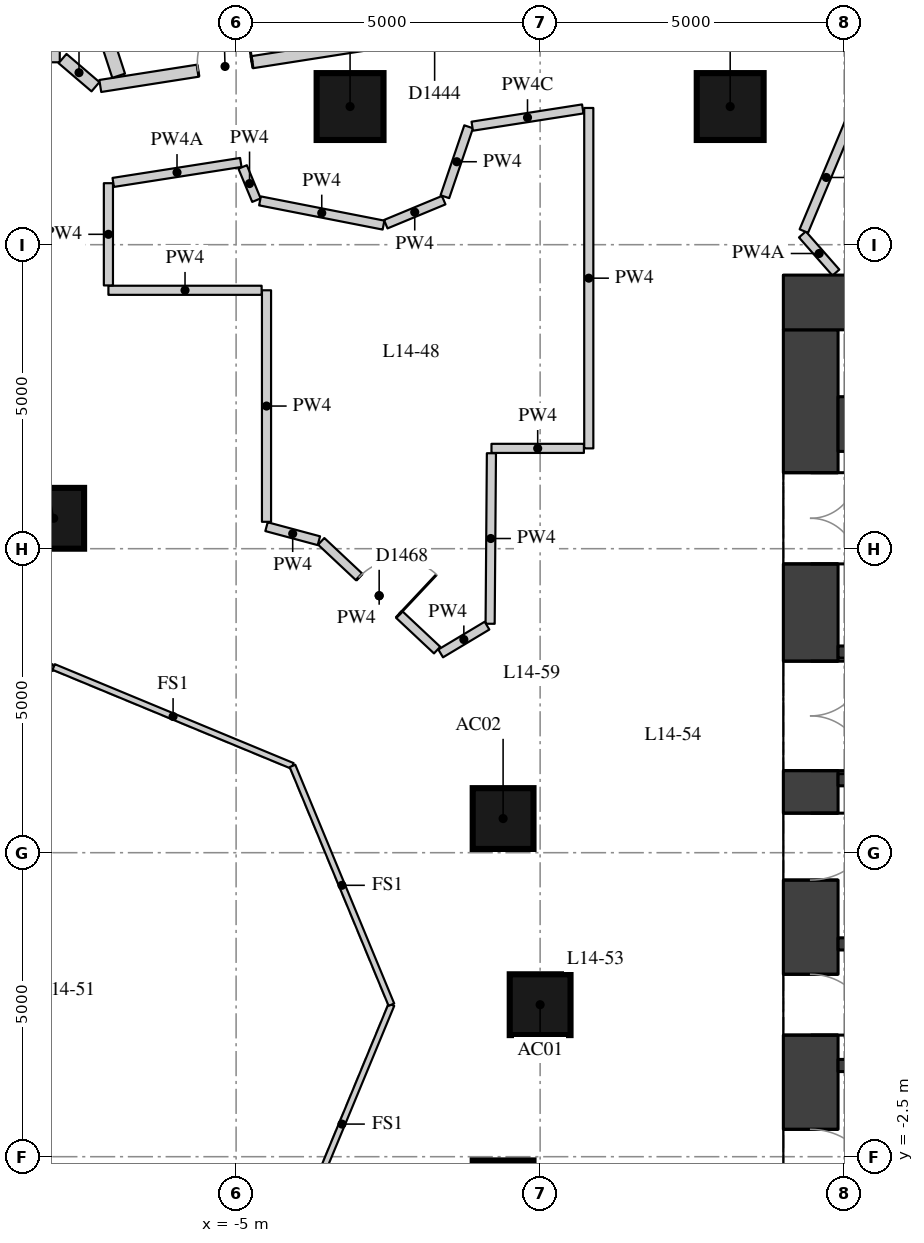
"""IFC4 building model, lengths in metres.
Left out: names, types, materials, properties, quantities, classifications, styles, units other than length and angle.
Written with IfcOpenShell. Run it as: python <this file> out.ifc"""

import sys

from ifc_helpers import new_model, si_unit, direction, frame, frame_2d, origin, origin_2d, place, context, subcontext, project, spatial, rectangle, extrude, element, fill, save


model = new_model("IFC4")
c1 = context("Model", 3, precision=1e-05, world=origin(), true_north=direction((0.0, 1.0)))
c2 = subcontext(c1, "Body", "Model", "MODEL_VIEW")
j1 = project(units=[si_unit("LENGTHUNIT", "METRE"), si_unit("PLANEANGLEUNIT", "RADIAN")], contexts=[c1])
p1 = place(None, origin())
s1 = spatial("IfcSite", under=j1, at=p1, CompositionType="ELEMENT")
p2 = place(p1, origin())
s2 = spatial("IfcBuilding", under=s1, at=p2, CompositionType="ELEMENT")
p3 = place(p2, frame((0.0, 0.0, 54.7)))
s3 = spatial("IfcBuildingStorey", under=s2, at=p3, CompositionType="ELEMENT", Elevation=54.7)
for number, where, z_axis, x_axis in (
    (1, (0.0, 0.0, 0.0), (0.0, 0.0, 1.0), (1.0, 0.0, 0.0)),
    (2, (-0.609, 3.062, 0.0), (0.0, 0.0, 1.0), (1.0, 0.0, 0.0)),
    (3, (-8.0, 8.0, 0.0), (0.0, 0.0, 1.0), (1.0, 0.0, 0.0)),
    (4, (-0.609, -3.062, 0.0), (0.0, 0.0, 1.0), (1.0, 0.0, 0.0)),
):
    element("IfcColumn", number, at=place(p3, frame(where, z_axis=z_axis, x_axis=x_axis)), inside=s3, PredefinedType="COLUMN", context=c2, shape_type="SweptSolid", body=[
        extrude(rectangle(XDim=1.0, YDim=1.0, at=origin_2d()), origin(), (0.0, 0.0, 1.0), 3.3),
    ])
for number, where, z_axis, x_axis in (
    (5, (3.126, 14.772, 0.0), (0.0, 0.0, 1.0), (1.0, 0.0, 0.0)),
    (6, (-3.126, 14.772, 0.0), (0.0, 0.0, 1.0), (1.0, 0.0, 0.0)),
):
    element("IfcColumn", number, at=place(p3, frame(where, z_axis=z_axis, x_axis=x_axis)), inside=s3, PredefinedType="COLUMN", context=c2, shape_type="SweptSolid", body=[
        extrude(rectangle(XDim=1.1, YDim=1.1, at=origin_2d()), origin(), (0.0, 0.0, 1.0), 3.3),
    ])
p4 = place(p3, frame((4.45, -11.1, 0.0), z_axis=(0.0, 0.0, 1.0), x_axis=(0.0, 1.0, 0.0)))
e7 = element("IfcWall", 7, at=p4, inside=s3, PredefinedType="SHEAR", context=c2, shape_type="SweptSolid", body=[
    extrude(rectangle(XDim=22.2, YDim=0.9, at=frame_2d((11.1, 0.0))), origin(), (0.0, 0.0, 1.0), 3.02),
])
p5 = place(p4, frame((2.35, 0.0, 0.0)))
e8 = element("IfcOpeningElement", 8, at=p5, cuts=e7, PredefinedType="OPENING", context=c2, shape_type="SweptSolid", body=[
    extrude(rectangle(XDim=1.5, YDim=2.1, at=frame_2d((0.75, 1.05))), frame((0.0, 0.46, 0.0), z_axis=(0.0, -1.0, 0.0), x_axis=(1.0, 0.0, 0.0)), (0.0, 0.0, 1.0), 0.92),
])
p6 = place(p4, frame((5.45, 0.0, 0.0)))
e9 = element("IfcOpeningElement", 9, at=p6, cuts=e7, PredefinedType="OPENING", context=c2, shape_type="SweptSolid", body=[
    extrude(rectangle(XDim=1.8, YDim=2.1, at=frame_2d((0.9, 1.05))), frame((0.0, 0.46, 0.0), z_axis=(0.0, -1.0, 0.0), x_axis=(1.0, 0.0, 0.0)), (0.0, 0.0, 1.0), 0.92),
])
p7 = place(p4, frame((7.95, 0.0, 0.0)))
e10 = element("IfcOpeningElement", 10, at=p7, cuts=e7, PredefinedType="OPENING", context=c2, shape_type="SweptSolid", body=[
    extrude(rectangle(XDim=1.1, YDim=2.1, at=frame_2d((0.55, 1.05))), frame((0.0, 0.46, 0.0), z_axis=(0.0, -1.0, 0.0), x_axis=(1.0, 0.0, 0.0)), (0.0, 0.0, 1.0), 0.92),
])
p8 = place(p4, frame((10.6, 0.0, 0.0)))
e11 = element("IfcOpeningElement", 11, at=p8, cuts=e7, PredefinedType="OPENING", context=c2, shape_type="SweptSolid", body=[
    extrude(rectangle(XDim=1.0, YDim=2.1, at=frame_2d((0.5, 1.05))), frame((0.0, 0.46, 0.0), z_axis=(0.0, -1.0, 0.0), x_axis=(1.0, 0.0, 0.0)), (0.0, 0.0, 1.0), 0.92),
])
p9 = place(p4, frame((13.15, 0.0, 0.0)))
e12 = element("IfcOpeningElement", 12, at=p9, cuts=e7, PredefinedType="OPENING", context=c2, shape_type="SweptSolid", body=[
    extrude(rectangle(XDim=1.1, YDim=2.1, at=frame_2d((0.55, 1.05))), frame((0.0, 0.46, 0.0), z_axis=(0.0, -1.0, 0.0), x_axis=(1.0, 0.0, 0.0)), (0.0, 0.0, 1.0), 0.92),
])
p10 = place(p4, frame((14.95, 0.0, 0.0)))
e13 = element("IfcOpeningElement", 13, at=p10, cuts=e7, PredefinedType="OPENING", context=c2, shape_type="SweptSolid", body=[
    extrude(rectangle(XDim=1.8, YDim=2.1, at=frame_2d((0.9, 1.05))), frame((0.0, 0.46, 0.0), z_axis=(0.0, -1.0, 0.0), x_axis=(1.0, 0.0, 0.0)), (0.0, 0.0, 1.0), 0.92),
])
p11 = place(p4, frame((18.35, 0.0, 0.0)))
e14 = element("IfcOpeningElement", 14, at=p11, cuts=e7, PredefinedType="OPENING", context=c2, shape_type="SweptSolid", body=[
    extrude(rectangle(XDim=1.5, YDim=2.1, at=frame_2d((0.75, 1.05))), frame((0.0, 0.46, 0.0), z_axis=(0.0, -1.0, 0.0), x_axis=(1.0, 0.0, 0.0)), (0.0, 0.0, 1.0), 0.92),
])
p12 = place(p3, frame((4.0, 11.55, 0.0), z_axis=(0.0, 0.0, 1.0), x_axis=(1.0, 0.0, 0.0)))
e15 = element("IfcWall", 15, at=p12, inside=s3, PredefinedType="SHEAR", context=c2, shape_type="SweptSolid", body=[
    extrude(rectangle(XDim=15.2, YDim=0.9, at=frame_2d((7.6, 0.0))), origin(), (0.0, 0.0, 1.0), 3.02),
])
p13 = place(p3, frame((4.9, 9.55, 0.0), z_axis=(0.0, 0.0, 1.0), x_axis=(1.0, 0.0, 0.0)))
e16 = element("IfcWall", 16, at=p13, inside=s3, PredefinedType="SHEAR", context=c2, shape_type="SweptSolid", body=[
    extrude(rectangle(XDim=10.2, YDim=0.9, at=frame_2d((5.1, 0.0))), origin(), (0.0, 0.0, 1.0), 3.02),
])
p14 = place(p3, frame((4.9, 5.8, 0.0), z_axis=(0.0, 0.0, 1.0), x_axis=(1.0, 0.0, 0.0)))
e17 = element("IfcWall", 17, at=p14, inside=s3, PredefinedType="SHEAR", context=c2, shape_type="SweptSolid", body=[
    extrude(rectangle(XDim=10.2, YDim=0.2, at=frame_2d((5.1, 0.0))), origin(), (0.0, 0.0, 1.0), 3.02),
])
p15 = place(p14, frame((6.75, 0.0, 0.0)))
e18 = element("IfcOpeningElement", 18, at=p15, cuts=e17, PredefinedType="OPENING", context=c2, shape_type="SweptSolid", body=[
    extrude(rectangle(XDim=1.1, YDim=2.1, at=frame_2d((0.55, 1.05))), frame((0.0, 0.11, 0.0), z_axis=(0.0, -1.0, 0.0), x_axis=(1.0, 0.0, 0.0)), (0.0, 0.0, 1.0), 0.22),
])
p16 = place(p14, frame((8.75, 0.0, 0.0)))
e19 = element("IfcOpeningElement", 19, at=p16, cuts=e17, PredefinedType="OPENING", context=c2, shape_type="SweptSolid", body=[
    extrude(rectangle(XDim=1.1, YDim=2.1, at=frame_2d((0.55, 1.05))), frame((0.0, 0.11, 0.0), z_axis=(0.0, -1.0, 0.0), x_axis=(1.0, 0.0, 0.0)), (0.0, 0.0, 1.0), 0.22),
])
p17 = place(p3, frame((4.9, 3.7, 0.0), z_axis=(0.0, 0.0, 1.0), x_axis=(1.0, 0.0, 0.0)))
e20 = element("IfcWall", 20, at=p17, inside=s3, PredefinedType="SHEAR", context=c2, shape_type="SweptSolid", body=[
    extrude(rectangle(XDim=10.2, YDim=0.2, at=frame_2d((5.1, 0.0))), origin(), (0.0, 0.0, 1.0), 3.02),
])
p18 = place(p17, frame((6.3, 0.0, 0.0)))
e21 = element("IfcOpeningElement", 21, at=p18, cuts=e20, PredefinedType="OPENING", context=c2, shape_type="SweptSolid", body=[
    extrude(rectangle(XDim=1.1, YDim=2.1, at=frame_2d((0.55, 1.05))), frame((0.0, 0.11, 0.0), z_axis=(0.0, -1.0, 0.0), x_axis=(1.0, 0.0, 0.0)), (0.0, 0.0, 1.0), 0.22),
])
p19 = place(p17, frame((8.6, 0.0, 0.0)))
e22 = element("IfcOpeningElement", 22, at=p19, cuts=e20, PredefinedType="OPENING", context=c2, shape_type="SweptSolid", body=[
    extrude(rectangle(XDim=1.1, YDim=2.1, at=frame_2d((0.55, 1.05))), frame((0.0, 0.11, 0.0), z_axis=(0.0, -1.0, 0.0), x_axis=(1.0, 0.0, 0.0)), (0.0, 0.0, 1.0), 0.22),
])
for number, where, z_axis, x_axis in (
    (23, (4.9, 1.0, 0.0), (0.0, 0.0, 1.0), (1.0, 0.0, 0.0)),
    (24, (4.9, -1.0, 0.0), (0.0, 0.0, 1.0), (1.0, 0.0, 0.0)),
):
    element("IfcWall", number, at=place(p3, frame(where, z_axis=z_axis, x_axis=x_axis)), inside=s3, PredefinedType="SHEAR", context=c2, shape_type="SweptSolid", body=[
        extrude(rectangle(XDim=10.2, YDim=0.2, at=frame_2d((5.1, 0.0))), origin(), (0.0, 0.0, 1.0), 3.02),
    ])
p20 = place(p3, frame((-15.531, 15.6, 0.0), z_axis=(0.0, 0.0, 1.0), x_axis=(1.0, 0.0, 0.0)))
e25 = element("IfcWall", 25, at=p20, inside=s3, PredefinedType="PARTITIONING", context=c2, shape_type="SweptSolid", body=[
    extrude(rectangle(XDim=7.632, YDim=0.2, at=frame_2d((3.816, 0.0))), origin(), (0.0, 0.0, 1.0), 3.02),
])
p21 = place(p20, frame((5.283, 0.0, 0.0)))
e26 = element("IfcOpeningElement", 26, at=p21, cuts=e25, PredefinedType="OPENING", context=c2, shape_type="SweptSolid", body=[
    extrude(rectangle(XDim=1.0, YDim=2.1, at=frame_2d((0.5, 1.05))), frame((0.0, 0.11, 0.0), z_axis=(0.0, -1.0, 0.0), x_axis=(1.0, 0.0, 0.0)), (0.0, 0.0, 1.0), 0.22),
])
p22 = place(p20, frame((0.451, 0.0, 0.0)))
e27 = element("IfcOpeningElement", 27, at=p22, cuts=e25, PredefinedType="OPENING", context=c2, shape_type="SweptSolid", body=[
    extrude(rectangle(XDim=1.1, YDim=2.1, at=frame_2d((0.55, 1.05))), frame((0.0, 0.11, 0.0), z_axis=(0.0, -1.0, 0.0), x_axis=(1.0, 0.0, 0.0)), (0.0, 0.0, 1.0), 0.22),
])
p23 = place(p3, frame((-7.854, 15.561, 0.0), z_axis=(0.0, 0.0, 1.0), x_axis=(0.759763914627, -0.650199041856, 0.0)))
e28 = element("IfcWall", 28, at=p23, inside=s3, PredefinedType="PARTITIONING", context=c2, shape_type="SweptSolid", body=[
    extrude(rectangle(XDim=0.713, YDim=0.2, at=frame_2d((0.356, 0.0))), origin(), (0.0, 0.0, 1.0), 3.02),
])
p24 = place(p3, frame((-7.234, 15.11, 0.0), z_axis=(0.0, 0.0, 1.0), x_axis=(0.987957763282, 0.154723811906, 0.0)))
e29 = element("IfcWall", 29, at=p24, inside=s3, PredefinedType="PARTITIONING", context=c2, shape_type="SweptSolid", body=[
    extrude(rectangle(XDim=11.012, YDim=0.2, at=frame_2d((5.506, 0.0))), origin(), (0.0, 0.0, 1.0), 3.02),
])
p25 = place(p24, frame((8.605, 0.0, 0.0)))
e30 = element("IfcOpeningElement", 30, at=p25, cuts=e29, PredefinedType="OPENING", context=c2, shape_type="SweptSolid", body=[
    extrude(rectangle(XDim=0.9, YDim=2.1, at=frame_2d((0.45, 1.05))), frame((0.0, 0.11, 0.0), z_axis=(0.0, -1.0, 0.0), x_axis=(1.0, 0.0, 0.0)), (0.0, 0.0, 1.0), 0.22),
])
p26 = place(p24, frame((5.116, 0.0, 0.0)))
e31 = element("IfcOpeningElement", 31, at=p26, cuts=e29, PredefinedType="OPENING", context=c2, shape_type="SweptSolid", body=[
    extrude(rectangle(XDim=0.9, YDim=2.1, at=frame_2d((0.45, 1.05))), frame((0.0, 0.11, 0.0), z_axis=(0.0, -1.0, 0.0), x_axis=(1.0, 0.0, 0.0)), (0.0, 0.0, 1.0), 0.22),
])
p27 = place(p24, frame((1.626, 0.0, 0.0)))
e32 = element("IfcOpeningElement", 32, at=p27, cuts=e29, PredefinedType="OPENING", context=c2, shape_type="SweptSolid", body=[
    extrude(rectangle(XDim=0.9, YDim=2.1, at=frame_2d((0.45, 1.05))), frame((0.0, 0.11, 0.0), z_axis=(0.0, -1.0, 0.0), x_axis=(1.0, 0.0, 0.0)), (0.0, 0.0, 1.0), 0.22),
])
p28 = place(p3, frame((3.739, 16.776, 0.0), z_axis=(0.0, 0.0, 1.0), x_axis=(0.923364778497, -0.383923802117, 0.0)))
e33 = element("IfcWall", 33, at=p28, inside=s3, PredefinedType="PARTITIONING", context=c2, shape_type="SweptSolid", body=[
    extrude(rectangle(XDim=8.273, YDim=0.2, at=frame_2d((4.137, 0.0))), origin(), (0.0, 0.0, 1.0), 3.02),
])
p29 = place(p28, frame((6.153, 0.0, 0.0)))
e34 = element("IfcOpeningElement", 34, at=p29, cuts=e33, PredefinedType="OPENING", context=c2, shape_type="SweptSolid", body=[
    extrude(rectangle(XDim=1.1, YDim=2.1, at=frame_2d((0.55, 1.05))), frame((0.0, 0.11, 0.0), z_axis=(0.0, -1.0, 0.0), x_axis=(1.0, 0.0, 0.0)), (0.0, 0.0, 1.0), 0.22),
])
p30 = place(p28, frame((1.298, 0.0, 0.0)))
e35 = element("IfcOpeningElement", 35, at=p30, cuts=e33, PredefinedType="OPENING", context=c2, shape_type="SweptSolid", body=[
    extrude(rectangle(XDim=0.9, YDim=2.1, at=frame_2d((0.45, 1.05))), frame((0.0, 0.11, 0.0), z_axis=(0.0, -1.0, 0.0), x_axis=(1.0, 0.0, 0.0)), (0.0, 0.0, 1.0), 0.22),
])
p31 = place(p3, frame((0.8, 14.749, 0.0), z_axis=(0.0, 0.0, 1.0), x_axis=(0.0, -1.0, 0.0)))
e36 = element("IfcWall", 36, at=p31, inside=s3, PredefinedType="PARTITIONING", context=c2, shape_type="SweptSolid", body=[
    extrude(rectangle(XDim=5.599, YDim=0.15, at=frame_2d((2.799, 0.0))), origin(), (0.0, 0.0, 1.0), 3.02),
])
p32 = place(p3, frame((0.72, 9.15, 0.0), z_axis=(0.0, 0.0, 1.0), x_axis=(-1.0, 0.0, 0.0)))
e37 = element("IfcWall", 37, at=p32, inside=s3, PredefinedType="PARTITIONING", context=c2, shape_type="SweptSolid", body=[
    extrude(rectangle(XDim=1.52, YDim=0.15, at=frame_2d((0.76, 0.0))), origin(), (0.0, 0.0, 1.0), 3.02),
])
p33 = place(p3, frame((-0.801, 9.07, 0.0), z_axis=(0.0, 0.0, 1.0), x_axis=(-0.007572902619, -0.999971325162, 0.0)))
e38 = element("IfcWall", 38, at=p33, inside=s3, PredefinedType="PARTITIONING", context=c2, shape_type="SweptSolid", body=[
    extrude(rectangle(XDim=2.805, YDim=0.15, at=frame_2d((1.402, 0.0))), origin(), (0.0, 0.0, 1.0), 3.02),
])
p34 = place(p3, frame((-0.874, 6.234, 0.0), z_axis=(0.0, 0.0, 1.0), x_axis=(-0.857759476535, -0.514051242984, 0.0)))
e39 = element("IfcWall", 39, at=p34, inside=s3, PredefinedType="PARTITIONING", context=c2, shape_type="SweptSolid", body=[
    extrude(rectangle(XDim=0.889, YDim=0.15, at=frame_2d((0.444, 0.0))), origin(), (0.0, 0.0, 1.0), 3.02),
])
p35 = place(p3, frame((-1.694, 5.832, 0.0), z_axis=(0.0, 0.0, 1.0), x_axis=(-0.729170056034, 0.684332542981, 0.0)))
e40 = element("IfcWall", 40, at=p35, inside=s3, PredefinedType="PARTITIONING", context=c2, shape_type="SweptSolid", body=[
    extrude(rectangle(XDim=2.614, YDim=0.15, at=frame_2d((1.307, 0.0))), origin(), (0.0, 0.0, 1.0), 3.02),
])
p36 = place(p35, frame((0.857, 0.0, 0.0)))
e41 = element("IfcOpeningElement", 41, at=p36, cuts=e40, PredefinedType="OPENING", context=c2, shape_type="SweptSolid", body=[
    extrude(rectangle(XDim=0.9, YDim=2.1, at=frame_2d((0.45, 1.05))), frame((0.0, 0.085, 0.0), z_axis=(0.0, -1.0, 0.0), x_axis=(1.0, 0.0, 0.0)), (0.0, 0.0, 1.0), 0.17),
])
p37 = place(p3, frame((-3.639, 7.631, 0.0), z_axis=(0.0, 0.0, 1.0), x_axis=(-0.965879594242, 0.258991523853, 0.0)))
e42 = element("IfcWall", 42, at=p37, inside=s3, PredefinedType="PARTITIONING", context=c2, shape_type="SweptSolid", body=[
    extrude(rectangle(XDim=0.892, YDim=0.15, at=frame_2d((0.446, 0.0))), origin(), (0.0, 0.0, 1.0), 3.02),
])
p38 = place(p3, frame((-4.5, 7.942, 0.0), z_axis=(0.0, 0.0, 1.0), x_axis=(0.0, 1.0, 0.0)))
e43 = element("IfcWall", 43, at=p38, inside=s3, PredefinedType="PARTITIONING", context=c2, shape_type="SweptSolid", body=[
    extrude(rectangle(XDim=3.808, YDim=0.15, at=frame_2d((1.904, 0.0))), origin(), (0.0, 0.0, 1.0), 3.02),
])
p39 = place(p3, frame((-4.58, 11.75, 0.0), z_axis=(0.0, 0.0, 1.0), x_axis=(-1.0, 0.0, 0.0)))
e44 = element("IfcWall", 44, at=p39, inside=s3, PredefinedType="PARTITIONING", context=c2, shape_type="SweptSolid", body=[
    extrude(rectangle(XDim=2.52, YDim=0.15, at=frame_2d((1.26, 0.0))), origin(), (0.0, 0.0, 1.0), 3.02),
])
p40 = place(p3, frame((-7.1, 11.83, 0.0), z_axis=(0.0, 0.0, 1.0), x_axis=(0.0, 1.0, 0.0)))
e45 = element("IfcWall", 45, at=p40, inside=s3, PredefinedType="PARTITIONING", context=c2, shape_type="SweptSolid", body=[
    extrude(rectangle(XDim=1.681, YDim=0.15, at=frame_2d((0.841, 0.0))), origin(), (0.0, 0.0, 1.0), 3.02),
])
p41 = place(p3, frame((-7.021, 13.524, 0.0), z_axis=(0.0, 0.0, 1.0), x_axis=(0.987976394461, 0.154604799366, 0.0)))
e46 = element("IfcWall", 46, at=p41, inside=s3, PredefinedType="PARTITIONING", context=c2, shape_type="SweptSolid", body=[
    extrude(rectangle(XDim=2.124, YDim=0.15, at=frame_2d((1.062, 0.0))), origin(), (0.0, 0.0, 1.0), 2.57),
])
p42 = place(p3, frame((-4.892, 13.778, 0.0), z_axis=(0.0, 0.0, 1.0), x_axis=(0.383178293395, -0.923674399056, 0.0)))
e47 = element("IfcWall", 47, at=p42, inside=s3, PredefinedType="PARTITIONING", context=c2, shape_type="SweptSolid", body=[
    extrude(rectangle(XDim=0.591, YDim=0.15, at=frame_2d((0.296, 0.0))), origin(), (0.0, 0.0, 1.0), 3.02),
])
p43 = place(p3, frame((-4.607, 13.22, 0.0), z_axis=(0.0, 0.0, 1.0), x_axis=(0.981304142817, -0.192463449234, 0.0)))
e48 = element("IfcWall", 48, at=p43, inside=s3, PredefinedType="PARTITIONING", context=c2, shape_type="SweptSolid", body=[
    extrude(rectangle(XDim=2.07, YDim=0.15, at=frame_2d((1.035, 0.0))), origin(), (0.0, 0.0, 1.0), 3.02),
])
p44 = place(p3, frame((-2.539, 12.837, 0.0), z_axis=(0.0, 0.0, 1.0), x_axis=(0.923768662954, 0.382950985565, 0.0)))
e49 = element("IfcWall", 49, at=p44, inside=s3, PredefinedType="PARTITIONING", context=c2, shape_type="SweptSolid", body=[
    extrude(rectangle(XDim=1.031, YDim=0.15, at=frame_2d((0.516, 0.0))), origin(), (0.0, 0.0, 1.0), 3.02),
])
p45 = place(p3, frame((-1.567, 13.289, 0.0), z_axis=(0.0, 0.0, 1.0), x_axis=(0.321769415776, 0.946818062286, 0.0)))
e50 = element("IfcWall", 50, at=p45, inside=s3, PredefinedType="PARTITIONING", context=c2, shape_type="SweptSolid", body=[
    extrude(rectangle(XDim=1.215, YDim=0.15, at=frame_2d((0.607, 0.0))), origin(), (0.0, 0.0, 1.0), 3.02),
])
p46 = place(p3, frame((-1.116, 14.449, 0.0), z_axis=(0.0, 0.0, 1.0), x_axis=(0.988017726025, 0.154340445315, 0.0)))
e51 = element("IfcWall", 51, at=p46, inside=s3, PredefinedType="PARTITIONING", context=c2, shape_type="SweptSolid", body=[
    extrude(rectangle(XDim=1.84, YDim=0.15, at=frame_2d((0.92, 0.0))), origin(), (0.0, 0.0, 1.0), 2.42),
])
p47 = place(p3, frame((4.865, 12.042, 0.0), z_axis=(0.0, 0.0, 1.0), x_axis=(-0.660014599896, 0.751252772323, 0.0)))
e52 = element("IfcWall", 52, at=p47, inside=s3, PredefinedType="PARTITIONING", context=c2, shape_type="SweptSolid", body=[
    extrude(rectangle(XDim=0.835, YDim=0.15, at=frame_2d((0.417, 0.0))), origin(), (0.0, 0.0, 1.0), 2.57),
])
p48 = place(p3, frame((4.337, 12.724, 0.0), z_axis=(0.0, 0.0, 1.0), x_axis=(0.386537433901, 0.922273718694, 0.0)))
e53 = element("IfcWall", 53, at=p48, inside=s3, PredefinedType="PARTITIONING", context=c2, shape_type="SweptSolid", body=[
    extrude(rectangle(XDim=1.911, YDim=0.15, at=frame_2d((0.956, 0.0))), origin(), (0.0, 0.0, 1.0), 3.02),
])
p49 = place(p3, frame((-9.034, 21.721, 0.0), z_axis=(0.0, 0.0, 1.0), x_axis=(0.310212430052, -0.950667264736, 0.0)))
e54 = element("IfcWall", 54, at=p49, inside=s3, PredefinedType="PARTITIONING", context=c2, shape_type="SweptSolid", body=[
    extrude(rectangle(XDim=6.777, YDim=0.22, at=frame_2d((3.388, 0.0))), origin(), (0.0, 0.0, 1.0), 3.02),
])
for number, where, z_axis, x_axis in (
    (55, (-2.446, 0.0, 0.0), (0.0, 0.0, 1.0), (-0.383, -0.924, 0.0)),
    (56, (-11.927, 3.927, 0.0), (0.0, 0.0, 1.0), (0.924, 0.383, 0.0)),
    (57, (-8.0, 5.554, 0.0), (0.0, 0.0, 1.0), (0.924, -0.383, 0.0)),
    (58, (-4.073, 3.927, 0.0), (0.0, 0.0, 1.0), (0.383, -0.924, 0.0)),
):
    element("IfcWall", number, at=place(p3, frame(where, z_axis=z_axis, x_axis=x_axis)), inside=s3, PredefinedType="PARTITIONING", context=c2, shape_type="SweptSolid", body=[
        extrude(rectangle(XDim=4.251, YDim=0.1, at=frame_2d((2.125, 0.0))), origin(), (0.0, 0.0, 1.0), 3.02),
    ])
p50 = place(p7, origin())
e59 = element("IfcDoor", 59, at=p50, inside=s3, OperationType="SINGLE_SWING_RIGHT", PredefinedType="DOOR", context=c2, shape_type="SweptSolid", body=[
    extrude(rectangle(XDim=1.1, YDim=2.1, at=frame_2d((0.55, 1.05))), frame((0.0, 0.025, 0.0), z_axis=(0.0, -1.0, 0.0), x_axis=(1.0, 0.0, 0.0)), (0.0, 0.0, 1.0), 0.05),
])
fill(e10, e59)
p51 = place(p8, origin())
e60 = element("IfcDoor", 60, at=p51, inside=s3, OperationType="SINGLE_SWING_RIGHT", PredefinedType="DOOR", context=c2, shape_type="SweptSolid", body=[
    extrude(rectangle(XDim=1.0, YDim=2.1, at=frame_2d((0.5, 1.05))), frame((0.0, 0.025, 0.0), z_axis=(0.0, -1.0, 0.0), x_axis=(1.0, 0.0, 0.0)), (0.0, 0.0, 1.0), 0.05),
])
fill(e11, e60)
p52 = place(p9, origin())
e61 = element("IfcDoor", 61, at=p52, inside=s3, OperationType="SINGLE_SWING_LEFT", PredefinedType="DOOR", context=c2, shape_type="SweptSolid", body=[
    extrude(rectangle(XDim=1.1, YDim=2.1, at=frame_2d((0.55, 1.05))), frame((0.0, 0.025, 0.0), z_axis=(0.0, -1.0, 0.0), x_axis=(1.0, 0.0, 0.0)), (0.0, 0.0, 1.0), 0.05),
])
fill(e12, e61)
p53 = place(p10, origin())
e62 = element("IfcDoor", 62, at=p53, inside=s3, OperationType="DOUBLE_DOOR_SINGLE_SWING", PredefinedType="DOOR", context=c2, shape_type="SweptSolid", body=[
    extrude(rectangle(XDim=1.8, YDim=2.1, at=frame_2d((0.9, 1.05))), frame((0.0, 0.025, 0.0), z_axis=(0.0, -1.0, 0.0), x_axis=(1.0, 0.0, 0.0)), (0.0, 0.0, 1.0), 0.05),
])
fill(e13, e62)
p54 = place(p11, origin())
e63 = element("IfcDoor", 63, at=p54, inside=s3, OperationType="DOUBLE_DOOR_SINGLE_SWING", PredefinedType="DOOR", context=c2, shape_type="SweptSolid", body=[
    extrude(rectangle(XDim=1.5, YDim=2.1, at=frame_2d((0.75, 1.05))), frame((0.0, 0.025, 0.0), z_axis=(0.0, -1.0, 0.0), x_axis=(1.0, 0.0, 0.0)), (0.0, 0.0, 1.0), 0.05),
])
fill(e14, e63)
p55 = place(p27, origin())
e64 = element("IfcDoor", 64, at=p55, inside=s3, OperationType="SINGLE_SWING_RIGHT", PredefinedType="DOOR", context=c2, shape_type="SweptSolid", body=[
    extrude(rectangle(XDim=0.9, YDim=2.1, at=frame_2d((0.45, 1.05))), frame((0.0, 0.025, 0.0), z_axis=(0.0, -1.0, 0.0), x_axis=(1.0, 0.0, 0.0)), (0.0, 0.0, 1.0), 0.05),
])
fill(e32, e64)
p56 = place(p36, origin())
e65 = element("IfcDoor", 65, at=p56, inside=s3, OperationType="SINGLE_SWING_RIGHT", PredefinedType="DOOR", context=c2, shape_type="SweptSolid", body=[
    extrude(rectangle(XDim=0.9, YDim=2.1, at=frame_2d((0.45, 1.05))), frame((0.0, 0.025, 0.0), z_axis=(0.0, -1.0, 0.0), x_axis=(1.0, 0.0, 0.0)), (0.0, 0.0, 1.0), 0.05),
])
fill(e41, e65)
save(model, sys.argv[1])
